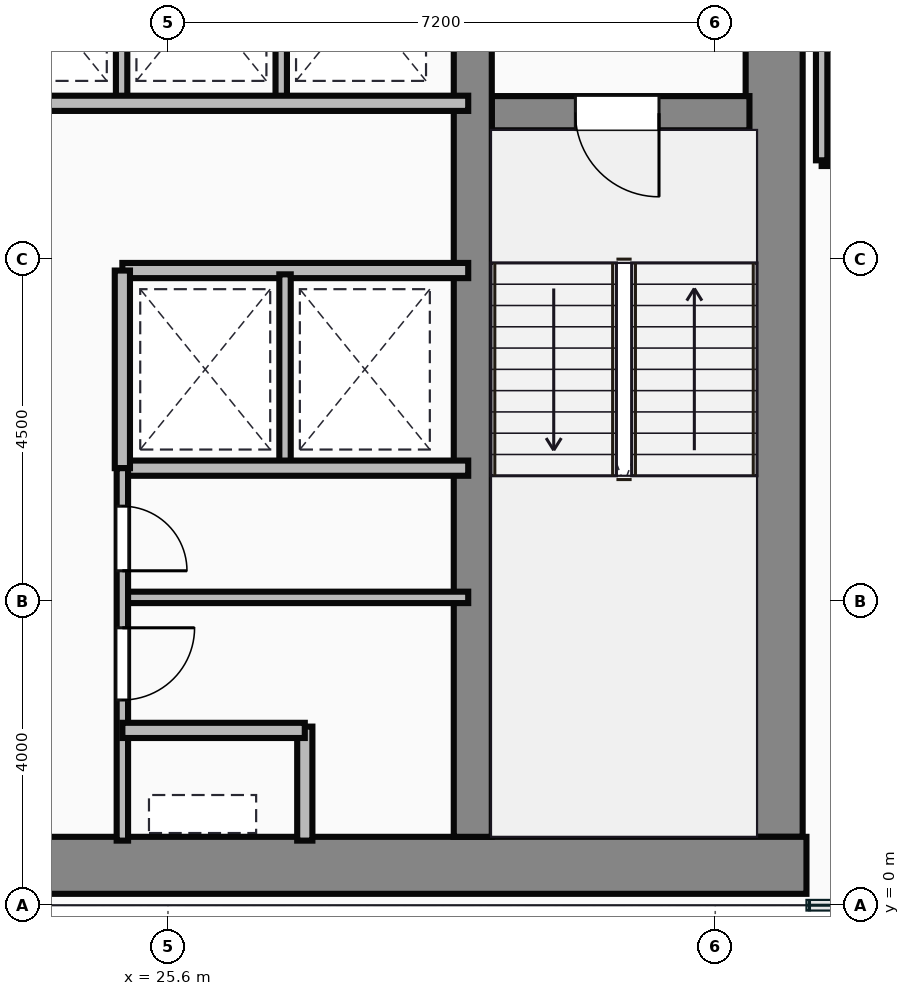
"""IFC4 building model, lengths in metres.
Left out: names, types, materials, properties, quantities, classifications, styles, units other than length and angle.
Written with IfcOpenShell. Run it as: python <this file> out.ifc"""

import sys

from ifc_helpers import new_model, si_unit, direction, frame, frame_2d, origin, place, context, subcontext, project, spatial, rectangle, extrude, source, transform, mapped, element, fill, save


model = new_model("IFC4")
c1 = context("Model", 3, precision=1e-05, world=origin(), true_north=direction((0.0, 1.0)))
c2 = subcontext(c1, "Body", "Model", "MODEL_VIEW")
j1 = project(units=[si_unit("LENGTHUNIT", "METRE"), si_unit("PLANEANGLEUNIT", "RADIAN")], contexts=[c1])
p1 = place(None, origin())
s1 = spatial("IfcSite", under=j1, at=p1, CompositionType="ELEMENT")
p2 = place(p1, origin())
s2 = spatial("IfcBuilding", under=s1, at=p2, CompositionType="ELEMENT")
p3 = place(p2, frame((0.0, 0.0, 88.65)))
s3 = spatial("IfcBuildingStorey", under=s2, at=p3, CompositionType="ELEMENT", Elevation=88.65)
m1 = source(origin(), c2, "Body", "SweptSolid", [
    extrude(rectangle(XDim=29.5, YDim=0.75, at=frame_2d((14.75, 0.0))), origin(), (0.0, 0.0, 1.0), 3.65),
])
p4 = place(p3, frame((4.5, 0.525, 0.0), z_axis=(0.0, 0.0, 1.0), x_axis=(1.0, 0.0, 0.0)))
e1 = element("IfcWall", 1, at=p4, inside=s3, PredefinedType="SHEAR", context=c2, shape_type="MappedRepresentation", body=[
    mapped(m1, transform((0.0, 0.0, 0.0))),
])
m2 = source(origin(), c2, "Body", "SweptSolid", [
    extrude(rectangle(XDim=13.1, YDim=0.75, at=frame_2d((6.55, 0.0))), origin(), (0.0, 0.0, 1.0), 3.65),
])
p5 = place(p3, frame((33.575, 0.9, 0.0), z_axis=(0.0, 0.0, 1.0), x_axis=(0.0, 1.0, 0.0)))
e2 = element("IfcWall", 2, at=p5, inside=s3, PredefinedType="SHEAR", context=c2, shape_type="MappedRepresentation", body=[
    mapped(m2, transform((0.0, 0.0, 0.0))),
])
m3 = source(origin(), c2, "Body", "SweptSolid", [
    extrude(rectangle(XDim=12.35, YDim=0.5, at=frame_2d((6.175, 0.0))), origin(), (0.0, 0.0, 1.0), 3.65),
])
p6 = place(p3, frame((29.61, 0.9, 0.0), z_axis=(0.0, 0.0, 1.0), x_axis=(0.0, 1.0, 0.0)))
e3 = element("IfcWall", 3, at=p6, inside=s3, PredefinedType="SHEAR", context=c2, shape_type="MappedRepresentation", body=[
    mapped(m3, transform((0.0, 0.0, 0.0))),
])
m4 = source(origin(), c2, "Body", "SweptSolid", [
    extrude(rectangle(XDim=3.39, YDim=0.45, at=frame_2d((1.695, 0.0))), origin(), (0.0, 0.0, 1.0), 3.65),
])
p7 = place(p3, frame((29.86, 10.42, 0.0), z_axis=(0.0, 0.0, 1.0), x_axis=(1.0, 0.0, 0.0)))
e4 = element("IfcWall", 4, at=p7, inside=s3, PredefinedType="SHEAR", context=c2, shape_type="MappedRepresentation", body=[
    mapped(m4, transform((0.0, 0.0, 0.0))),
])
p8 = place(p7, frame((1.1, 0.0, 0.0)))
e5 = element("IfcOpeningElement", 5, at=p8, cuts=e4, PredefinedType="OPENING", context=c2, shape_type="SweptSolid", body=[
    extrude(rectangle(XDim=1.1, YDim=2.15, at=frame_2d((0.55, 1.075))), frame((0.0, 0.235, 0.0), z_axis=(0.0, -1.0, 0.0), x_axis=(1.0, 0.0, 0.0)), (0.0, 0.0, 1.0), 0.47),
])
m5 = source(origin(), c2, "Body", "SweptSolid", [
    extrude(rectangle(XDim=8.8, YDim=0.2, at=frame_2d((4.4, 0.0))), origin(), (0.0, 0.0, 1.0), 3.4),
])
p9 = place(p3, frame((20.75, 10.55, 0.0), z_axis=(0.0, 0.0, 1.0), x_axis=(1.0, 0.0, 0.0)))
e6 = element("IfcWall", 6, at=p9, inside=s3, PredefinedType="PARTITIONING", context=c2, shape_type="MappedRepresentation", body=[
    mapped(m5, transform((0.0, 0.0, 0.0))),
])
m6 = source(origin(), c2, "Body", "SweptSolid", [
    extrude(rectangle(XDim=2.85, YDim=0.15, at=frame_2d((1.425, 0.0))), origin(), (0.0, 0.0, 1.0), 3.4),
])
for number, where, z_axis, x_axis in (
    (7, (24.99, 10.6, 0.0), (0.0, 0.0, 1.0), (0.0, 1.0, 0.0)),
    (8, (27.09, 10.6, 0.0), (0.0, 0.0, 1.0), (0.0, 1.0, 0.0)),
):
    element("IfcWall", number, at=place(p3, frame(where, z_axis=z_axis, x_axis=x_axis)), inside=s3, PredefinedType="PARTITIONING", context=c2, shape_type="MappedRepresentation", body=[
        mapped(m6, transform((0.0, 0.0, 0.0))),
    ])
m7 = source(origin(), c2, "Body", "SweptSolid", [
    extrude(rectangle(XDim=4.55, YDim=0.2, at=frame_2d((2.275, 0.0))), origin(), (0.0, 0.0, 1.0), 3.4),
])
for number, where, z_axis, x_axis in (
    (9, (25.0, 8.35, 0.0), (0.0, 0.0, 1.0), (1.0, 0.0, 0.0)),
    (10, (25.0, 5.75, 0.0), (0.0, 0.0, 1.0), (1.0, 0.0, 0.0)),
):
    element("IfcWall", number, at=place(p3, frame(where, z_axis=z_axis, x_axis=x_axis)), inside=s3, PredefinedType="PARTITIONING", context=c2, shape_type="MappedRepresentation", body=[
        mapped(m7, transform((0.0, 0.0, 0.0))),
    ])
m8 = source(origin(), c2, "Body", "SweptSolid", [
    extrude(rectangle(XDim=2.6, YDim=0.2, at=frame_2d((1.3, 0.0))), origin(), (0.0, 0.0, 1.0), 3.4),
])
p10 = place(p3, frame((25.0, 5.75, 0.0), z_axis=(0.0, 0.0, 1.0), x_axis=(0.0, 1.0, 0.0)))
e11 = element("IfcWall", 11, at=p10, inside=s3, PredefinedType="PARTITIONING", context=c2, shape_type="MappedRepresentation", body=[
    mapped(m8, transform((0.0, 0.0, 0.0))),
])
m9 = source(origin(), c2, "Body", "SweptSolid", [
    extrude(rectangle(XDim=2.5, YDim=0.15, at=frame_2d((1.25, 0.0))), origin(), (0.0, 0.0, 1.0), 3.4),
])
p11 = place(p3, frame((27.14, 5.8, 0.0), z_axis=(0.0, 0.0, 1.0), x_axis=(0.0, 1.0, 0.0)))
e12 = element("IfcWall", 12, at=p11, inside=s3, PredefinedType="PARTITIONING", context=c2, shape_type="MappedRepresentation", body=[
    mapped(m9, transform((0.0, 0.0, 0.0))),
])
m10 = source(origin(), c2, "Body", "SweptSolid", [
    extrude(rectangle(XDim=4.9, YDim=0.15, at=frame_2d((2.45, 0.0))), origin(), (0.0, 0.0, 1.0), 3.4),
])
p12 = place(p3, frame((25.0, 0.85, 0.0), z_axis=(0.0, 0.0, 1.0), x_axis=(0.0, 1.0, 0.0)))
e13 = element("IfcWall", 13, at=p12, inside=s3, PredefinedType="PARTITIONING", context=c2, shape_type="MappedRepresentation", body=[
    mapped(m10, transform((0.0, 0.0, 0.0))),
])
p13 = place(p12, frame((1.85, 0.0, 0.0)))
e14 = element("IfcOpeningElement", 14, at=p13, cuts=e13, PredefinedType="OPENING", context=c2, shape_type="SweptSolid", body=[
    extrude(rectangle(XDim=0.95, YDim=2.15, at=frame_2d((0.475, 1.075))), frame((0.0, 0.085, 0.0), z_axis=(0.0, -1.0, 0.0), x_axis=(1.0, 0.0, 0.0)), (0.0, 0.0, 1.0), 0.17),
])
p14 = place(p12, frame((3.55, 0.0, 0.0)))
e15 = element("IfcOpeningElement", 15, at=p14, cuts=e13, PredefinedType="OPENING", context=c2, shape_type="SweptSolid", body=[
    extrude(rectangle(XDim=0.85, YDim=2.15, at=frame_2d((0.425, 1.075))), frame((0.0, 0.085, 0.0), z_axis=(0.0, -1.0, 0.0), x_axis=(1.0, 0.0, 0.0)), (0.0, 0.0, 1.0), 0.17),
])
m11 = source(origin(), c2, "Body", "SweptSolid", [
    extrude(rectangle(XDim=2.4, YDim=0.2, at=frame_2d((1.2, 0.0))), origin(), (0.0, 0.0, 1.0), 3.4),
])
p15 = place(p3, frame((25.0, 2.3, 0.0), z_axis=(0.0, 0.0, 1.0), x_axis=(1.0, 0.0, 0.0)))
e16 = element("IfcWall", 16, at=p15, inside=s3, PredefinedType="PARTITIONING", context=c2, shape_type="MappedRepresentation", body=[
    mapped(m11, transform((0.0, 0.0, 0.0))),
])
m12 = source(origin(), c2, "Body", "SweptSolid", [
    extrude(rectangle(XDim=1.5, YDim=0.2, at=frame_2d((0.75, 0.0))), origin(), (0.0, 0.0, 1.0), 3.4),
])
p16 = place(p3, frame((27.4, 0.85, 0.0), z_axis=(0.0, 0.0, 1.0), x_axis=(0.0, 1.0, 0.0)))
e17 = element("IfcWall", 17, at=p16, inside=s3, PredefinedType="PARTITIONING", context=c2, shape_type="MappedRepresentation", body=[
    mapped(m12, transform((0.0, 0.0, 0.0))),
])
m13 = source(origin(), c2, "Body", "SweptSolid", [
    extrude(rectangle(XDim=4.55, YDim=0.15, at=frame_2d((2.275, 0.0))), origin(), (0.0, 0.0, 1.0), 3.4),
])
p17 = place(p3, frame((25.0, 4.05, 0.0), z_axis=(0.0, 0.0, 1.0), x_axis=(1.0, 0.0, 0.0)))
e18 = element("IfcWall", 18, at=p17, inside=s3, PredefinedType="PARTITIONING", context=c2, shape_type="MappedRepresentation", body=[
    mapped(m13, transform((0.0, 0.0, 0.0))),
])
m14 = source(origin(), c2, "Body", "SweptSolid", [
    extrude(rectangle(XDim=4.8, YDim=0.15, at=frame_2d((2.4, 0.0))), origin(), (0.0, 0.0, 1.0), 3.4),
])
p18 = place(p3, frame((34.2, 9.8, 0.0), z_axis=(0.0, 0.0, 1.0), x_axis=(1.0, 0.0, 0.0)))
e19 = element("IfcWall", 19, at=p18, inside=s3, PredefinedType="PARTITIONING", context=c2, shape_type="MappedRepresentation", body=[
    mapped(m14, transform((0.0, 0.0, 0.0))),
])
m15 = source(origin(), c2, "Body", "SweptSolid", [
    extrude(rectangle(XDim=4.18, YDim=0.15, at=frame_2d((2.09, 0.0))), origin(), (0.0, 0.0, 1.0), 3.4),
])
p19 = place(p3, frame((34.2, 9.8, 0.0), z_axis=(0.0, 0.0, 1.0), x_axis=(0.0, 1.0, 0.0)))
e20 = element("IfcWall", 20, at=p19, inside=s3, PredefinedType="PARTITIONING", context=c2, shape_type="MappedRepresentation", body=[
    mapped(m15, transform((0.0, 0.0, 0.0))),
])
m16 = source(origin(), c2, "Body", "SweptSolid", [
    extrude(rectangle(XDim=1.1, YDim=2.15, at=frame_2d((0.55, 1.075))), frame((0.0, 0.025, 0.0), z_axis=(0.0, -1.0, 0.0), x_axis=(1.0, 0.0, 0.0)), (0.0, 0.0, 1.0), 0.05),
])
p20 = place(p8, frame((1.1, 0.0, 0.0), z_axis=(0.0, 0.0, 1.0), x_axis=(-1.0, 0.0, 0.0)))
e21 = element("IfcDoor", 21, at=p20, inside=s3, OperationType="SINGLE_SWING_RIGHT", PredefinedType="DOOR", context=c2, shape_type="MappedRepresentation", body=[
    mapped(m16, transform((0.0, 0.0, 0.0))),
])
fill(e5, e21)
m17 = source(origin(), c2, "Body", "SweptSolid", [
    extrude(rectangle(XDim=0.95, YDim=2.15, at=frame_2d((0.475, 1.075))), frame((0.0, 0.025, 0.0), z_axis=(0.0, -1.0, 0.0), x_axis=(1.0, 0.0, 0.0)), (0.0, 0.0, 1.0), 0.05),
])
p21 = place(p13, origin())
e22 = element("IfcDoor", 22, at=p21, inside=s3, OperationType="SINGLE_SWING_RIGHT", PredefinedType="DOOR", context=c2, shape_type="MappedRepresentation", body=[
    mapped(m17, transform((0.0, 0.0, 0.0))),
])
fill(e14, e22)
m18 = source(origin(), c2, "Body", "SweptSolid", [
    extrude(rectangle(XDim=0.85, YDim=2.15, at=frame_2d((0.425, 1.075))), frame((0.0, 0.025, 0.0), z_axis=(0.0, -1.0, 0.0), x_axis=(1.0, 0.0, 0.0)), (0.0, 0.0, 1.0), 0.05),
])
p22 = place(p14, origin())
e23 = element("IfcDoor", 23, at=p22, inside=s3, OperationType="SINGLE_SWING_LEFT", PredefinedType="DOOR", context=c2, shape_type="MappedRepresentation", body=[
    mapped(m18, transform((0.0, 0.0, 0.0))),
])
fill(e15, e23)
save(model, sys.argv[1])
